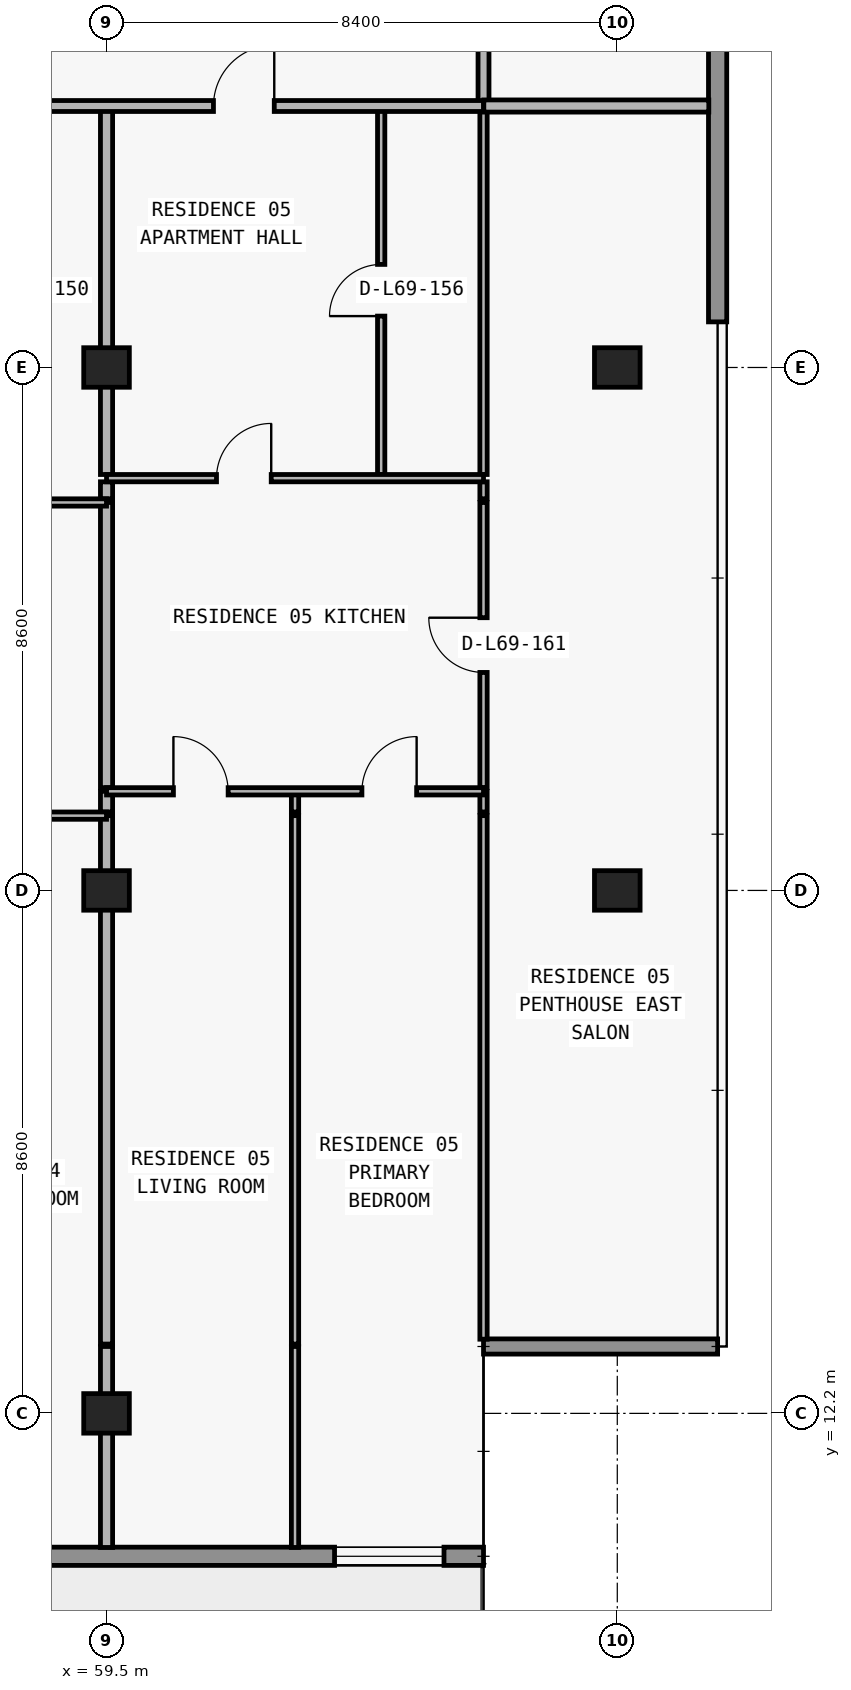
"""IFC4 building model, lengths in metres.
Left out: names, types, materials, properties, quantities, classifications, styles, units other than length and angle.
Written with IfcOpenShell. Run it as: python <this file> out.ifc"""

import sys

from ifc_helpers import new_model, si_unit, direction, frame, frame_2d, origin, origin_2d, place, context, subcontext, project, spatial, rectangle, extrude, element, fill, save


model = new_model("IFC4")
c1 = context("Model", 3, precision=1e-05, world=origin(), true_north=direction((0.0, 1.0)))
c2 = subcontext(c1, "Body", "Model", "MODEL_VIEW")
j1 = project(units=[si_unit("LENGTHUNIT", "METRE"), si_unit("PLANEANGLEUNIT", "RADIAN")], contexts=[c1])
p1 = place(None, origin())
s1 = spatial("IfcSite", under=j1, at=p1, CompositionType="ELEMENT")
p2 = place(p1, origin())
s2 = spatial("IfcBuilding", under=s1, at=p2, CompositionType="ELEMENT")
p3 = place(p2, frame((0.0, 0.0, 246.3)))
s3 = spatial("IfcBuildingStorey", under=s2, at=p3, CompositionType="ELEMENT", Elevation=246.3)
for number, where, z_axis, x_axis in (
    (1, (59.5, 12.2, 0.0), (0.0, 0.0, 1.0), (1.0, 0.0, 0.0)),
    (2, (59.5, 20.8, 0.0), (0.0, 0.0, 1.0), (1.0, 0.0, 0.0)),
    (3, (67.9, 20.8, 0.0), (0.0, 0.0, 1.0), (1.0, 0.0, 0.0)),
    (4, (59.5, 29.4, 0.0), (0.0, 0.0, 1.0), (1.0, 0.0, 0.0)),
    (5, (67.9, 29.4, 0.0), (0.0, 0.0, 1.0), (1.0, 0.0, 0.0)),
):
    element("IfcColumn", number, at=place(p3, frame(where, z_axis=z_axis, x_axis=x_axis)), inside=s3, PredefinedType="COLUMN", context=c2, shape_type="SweptSolid", body=[
        extrude(rectangle(XDim=0.75, YDim=0.65, at=origin_2d()), origin(), (0.0, 0.0, 1.0), 3.05),
    ])
p4 = place(p3, frame((65.7, 9.85, 0.0), z_axis=(0.0, 0.0, 1.0), x_axis=(-1.0, 0.0, 0.0)))
e6 = element("IfcWall", 6, at=p4, inside=s3, PredefinedType="STANDARD", context=c2, shape_type="SweptSolid", body=[
    extrude(rectangle(XDim=53.6, YDim=0.3, at=frame_2d((26.8, 0.0))), origin(), (0.0, 0.0, 1.0), 3.05),
])
p5 = place(p4, frame((48.05, 0.0, 0.85)))
e7 = element("IfcOpeningElement", 7, at=p5, cuts=e6, PredefinedType="OPENING", context=c2, shape_type="SweptSolid", body=[
    extrude(rectangle(XDim=1.8, YDim=1.55, at=frame_2d((0.9, 0.775))), frame((0.0, 0.16, 0.0), z_axis=(0.0, -1.0, 0.0), x_axis=(1.0, 0.0, 0.0)), (0.0, 0.0, 1.0), 0.32),
])
p6 = place(p4, frame((44.09, 0.0, 0.0)))
e8 = element("IfcOpeningElement", 8, at=p6, cuts=e6, PredefinedType="OPENING", context=c2, shape_type="SweptSolid", body=[
    extrude(rectangle(XDim=2.0, YDim=2.3, at=frame_2d((1.0, 1.15))), frame((0.0, 0.16, 0.0), z_axis=(0.0, -1.0, 0.0), x_axis=(1.0, 0.0, 0.0)), (0.0, 0.0, 1.0), 0.32),
])
p7 = place(p4, frame((39.99, 0.0, 0.85)))
e9 = element("IfcOpeningElement", 9, at=p7, cuts=e6, PredefinedType="OPENING", context=c2, shape_type="SweptSolid", body=[
    extrude(rectangle(XDim=1.8, YDim=1.55, at=frame_2d((0.9, 0.775))), frame((0.0, 0.16, 0.0), z_axis=(0.0, -1.0, 0.0), x_axis=(1.0, 0.0, 0.0)), (0.0, 0.0, 1.0), 0.32),
])
p8 = place(p4, frame((36.09, 0.0, 0.0)))
e10 = element("IfcOpeningElement", 10, at=p8, cuts=e6, PredefinedType="OPENING", context=c2, shape_type="SweptSolid", body=[
    extrude(rectangle(XDim=2.0, YDim=2.3, at=frame_2d((1.0, 1.15))), frame((0.0, 0.16, 0.0), z_axis=(0.0, -1.0, 0.0), x_axis=(1.0, 0.0, 0.0)), (0.0, 0.0, 1.0), 0.32),
])
p9 = place(p4, frame((31.41, 0.0, 0.65)))
e11 = element("IfcOpeningElement", 11, at=p9, cuts=e6, PredefinedType="OPENING", context=c2, shape_type="SweptSolid", body=[
    extrude(rectangle(XDim=2.6, YDim=1.85, at=frame_2d((1.3, 0.925))), frame((0.0, 0.16, 0.0), z_axis=(0.0, -1.0, 0.0), x_axis=(1.0, 0.0, 0.0)), (0.0, 0.0, 1.0), 0.32),
])
p10 = place(p4, frame((25.7, 0.0, 0.85)))
e12 = element("IfcOpeningElement", 12, at=p10, cuts=e6, PredefinedType="OPENING", context=c2, shape_type="SweptSolid", body=[
    extrude(rectangle(XDim=2.2, YDim=1.55, at=frame_2d((1.1, 0.775))), frame((0.0, 0.16, 0.0), z_axis=(0.0, -1.0, 0.0), x_axis=(1.0, 0.0, 0.0)), (0.0, 0.0, 1.0), 0.32),
])
p11 = place(p4, frame((17.7, 0.0, 0.85)))
e13 = element("IfcOpeningElement", 13, at=p11, cuts=e6, PredefinedType="OPENING", context=c2, shape_type="SweptSolid", body=[
    extrude(rectangle(XDim=2.2, YDim=1.55, at=frame_2d((1.1, 0.775))), frame((0.0, 0.16, 0.0), z_axis=(0.0, -1.0, 0.0), x_axis=(1.0, 0.0, 0.0)), (0.0, 0.0, 1.0), 0.32),
])
p12 = place(p4, frame((11.29, 0.0, 0.0)))
e14 = element("IfcOpeningElement", 14, at=p12, cuts=e6, PredefinedType="OPENING", context=c2, shape_type="SweptSolid", body=[
    extrude(rectangle(XDim=2.0, YDim=2.3, at=frame_2d((1.0, 1.15))), frame((0.0, 0.16, 0.0), z_axis=(0.0, -1.0, 0.0), x_axis=(1.0, 0.0, 0.0)), (0.0, 0.0, 1.0), 0.32),
])
p13 = place(p4, frame((7.19, 0.0, 0.85)))
e15 = element("IfcOpeningElement", 15, at=p13, cuts=e6, PredefinedType="OPENING", context=c2, shape_type="SweptSolid", body=[
    extrude(rectangle(XDim=1.8, YDim=1.55, at=frame_2d((0.9, 0.775))), frame((0.0, 0.16, 0.0), z_axis=(0.0, -1.0, 0.0), x_axis=(1.0, 0.0, 0.0)), (0.0, 0.0, 1.0), 0.32),
])
p14 = place(p4, frame((0.65, 0.0, 0.85)))
e16 = element("IfcOpeningElement", 16, at=p14, cuts=e6, PredefinedType="OPENING", context=c2, shape_type="SweptSolid", body=[
    extrude(rectangle(XDim=1.8, YDim=1.55, at=frame_2d((0.9, 0.775))), frame((0.0, 0.16, 0.0), z_axis=(0.0, -1.0, 0.0), x_axis=(1.0, 0.0, 0.0)), (0.0, 0.0, 1.0), 0.32),
])
p15 = place(p3, frame((65.7, 13.3, 0.0), z_axis=(0.0, 0.0, 1.0), x_axis=(1.0, 0.0, 0.0)))
e17 = element("IfcWall", 17, at=p15, inside=s3, PredefinedType="ELEMENTEDWALL", context=c2, shape_type="SweptSolid", body=[
    extrude(rectangle(XDim=3.85, YDim=0.25, at=frame_2d((1.925, 0.0))), origin(), (0.0, 0.0, 1.0), 3.05),
])
p16 = place(p3, frame((69.55, 47.0, 0.0), z_axis=(0.0, 0.0, 1.0), x_axis=(0.0, -1.0, 0.0)))
e18 = element("IfcWall", 18, at=p16, inside=s3, PredefinedType="STANDARD", context=c2, shape_type="SweptSolid", body=[
    extrude(rectangle(XDim=16.85, YDim=0.3, at=frame_2d((8.425, 0.0))), origin(), (0.0, 0.0, 1.0), 3.05),
])
p17 = place(p3, frame((59.5, 9.995, 0.0), z_axis=(0.0, 0.0, 1.0), x_axis=(0.0, 1.0, 0.0)))
e19 = element("IfcWall", 19, at=p17, inside=s3, PredefinedType="PARTITIONING", context=c2, shape_type="SweptSolid", body=[
    extrude(rectangle(XDim=3.305, YDim=0.2, at=frame_2d((1.652, 0.0))), origin(), (0.0, 0.0, 1.0), 2.263),
])
p18 = place(p3, frame((59.5, 13.34, 0.0), z_axis=(0.0, 0.0, 1.0), x_axis=(0.0, 1.0, 0.0)))
e20 = element("IfcWall", 20, at=p18, inside=s3, PredefinedType="PARTITIONING", context=c2, shape_type="SweptSolid", body=[
    extrude(rectangle(XDim=8.69, YDim=0.2, at=frame_2d((4.345, 0.0))), origin(), (0.0, 0.0, 1.0), 2.263),
])
p19 = place(p3, frame((59.5, 22.09, 0.0), z_axis=(0.0, 0.0, 1.0), x_axis=(0.0, 1.0, 0.0)))
e21 = element("IfcWall", 21, at=p19, inside=s3, PredefinedType="PARTITIONING", context=c2, shape_type="SweptSolid", body=[
    extrude(rectangle(XDim=0.34, YDim=0.2, at=frame_2d((0.17, 0.0))), origin(), (0.0, 0.0, 1.0), 2.263),
])
p20 = place(p3, frame((59.5, 22.49, 0.0), z_axis=(0.0, 0.0, 1.0), x_axis=(0.0, 1.0, 0.0)))
e22 = element("IfcWall", 22, at=p20, inside=s3, PredefinedType="PARTITIONING", context=c2, shape_type="SweptSolid", body=[
    extrude(rectangle(XDim=4.69, YDim=0.2, at=frame_2d((2.345, 0.0))), origin(), (0.0, 0.0, 1.0), 2.263),
])
p21 = place(p3, frame((59.5, 27.24, 0.0), z_axis=(0.0, 0.0, 1.0), x_axis=(0.0, 1.0, 0.0)))
e23 = element("IfcWall", 23, at=p21, inside=s3, PredefinedType="PARTITIONING", context=c2, shape_type="SweptSolid", body=[
    extrude(rectangle(XDim=0.28, YDim=0.2, at=frame_2d((0.14, 0.0))), origin(), (0.0, 0.0, 1.0), 2.263),
])
p22 = place(p3, frame((59.5, 27.64, 0.0), z_axis=(0.0, 0.0, 1.0), x_axis=(0.0, 1.0, 0.0)))
e24 = element("IfcWall", 24, at=p22, inside=s3, PredefinedType="PARTITIONING", context=c2, shape_type="SweptSolid", body=[
    extrude(rectangle(XDim=6.06, YDim=0.2, at=frame_2d((3.03, 0.0))), origin(), (0.0, 0.0, 1.0), 2.263),
])
p23 = place(p3, frame((62.6, 9.995, 0.0), z_axis=(0.0, 0.0, 1.0), x_axis=(0.0, 1.0, 0.0)))
e25 = element("IfcWall", 25, at=p23, inside=s3, PredefinedType="PARTITIONING", context=c2, shape_type="SweptSolid", body=[
    extrude(rectangle(XDim=3.305, YDim=0.12, at=frame_2d((1.652, 0.0))), origin(), (0.0, 0.0, 1.0), 3.05),
])
p24 = place(p3, frame((62.6, 13.34, 0.0), z_axis=(0.0, 0.0, 1.0), x_axis=(0.0, 1.0, 0.0)))
e26 = element("IfcWall", 26, at=p24, inside=s3, PredefinedType="PARTITIONING", context=c2, shape_type="SweptSolid", body=[
    extrude(rectangle(XDim=8.69, YDim=0.12, at=frame_2d((4.345, 0.0))), origin(), (0.0, 0.0, 1.0), 3.05),
])
p25 = place(p3, frame((62.6, 22.09, 0.0), z_axis=(0.0, 0.0, 1.0), x_axis=(0.0, 1.0, 0.0)))
e27 = element("IfcWall", 27, at=p25, inside=s3, PredefinedType="PARTITIONING", context=c2, shape_type="SweptSolid", body=[
    extrude(rectangle(XDim=0.34, YDim=0.12, at=frame_2d((0.17, 0.0))), origin(), (0.0, 0.0, 1.0), 3.05),
])
p26 = place(p3, frame((64.017, 27.64, 0.0), z_axis=(0.0, 0.0, 1.0), x_axis=(0.0, 1.0, 0.0)))
e28 = element("IfcWall", 28, at=p26, inside=s3, PredefinedType="PARTITIONING", context=c2, shape_type="SweptSolid", body=[
    extrude(rectangle(XDim=6.06, YDim=0.12, at=frame_2d((3.03, 0.0))), origin(), (0.0, 0.0, 1.0), 3.05),
])
p27 = place(p26, frame((2.605, 0.0, 0.0)))
e29 = element("IfcOpeningElement", 29, at=p27, cuts=e28, PredefinedType="OPENING", context=c2, shape_type="SweptSolid", body=[
    extrude(rectangle(XDim=0.85, YDim=2.1, at=frame_2d((0.425, 1.05))), frame((0.0, 0.07, 0.0), z_axis=(0.0, -1.0, 0.0), x_axis=(1.0, 0.0, 0.0)), (0.0, 0.0, 1.0), 0.14),
])
p28 = place(p3, frame((65.7, 13.42, 0.0), z_axis=(0.0, 0.0, 1.0), x_axis=(0.0, 1.0, 0.0)))
e30 = element("IfcWall", 30, at=p28, inside=s3, PredefinedType="PARTITIONING", context=c2, shape_type="SweptSolid", body=[
    extrude(rectangle(XDim=8.61, YDim=0.12, at=frame_2d((4.305, 0.0))), origin(), (0.0, 0.0, 1.0), 2.629),
])
p29 = place(p3, frame((65.7, 22.09, 0.0), z_axis=(0.0, 0.0, 1.0), x_axis=(0.0, 1.0, 0.0)))
e31 = element("IfcWall", 31, at=p29, inside=s3, PredefinedType="PARTITIONING", context=c2, shape_type="SweptSolid", body=[
    extrude(rectangle(XDim=0.34, YDim=0.12, at=frame_2d((0.17, 0.0))), origin(), (0.0, 0.0, 1.0), 2.629),
])
p30 = place(p3, frame((65.7, 22.49, 0.0), z_axis=(0.0, 0.0, 1.0), x_axis=(0.0, 1.0, 0.0)))
e32 = element("IfcWall", 32, at=p30, inside=s3, PredefinedType="PARTITIONING", context=c2, shape_type="SweptSolid", body=[
    extrude(rectangle(XDim=4.69, YDim=0.12, at=frame_2d((2.345, 0.0))), origin(), (0.0, 0.0, 1.0), 2.629),
])
p31 = place(p30, frame((1.895, 0.0, 0.0)))
e33 = element("IfcOpeningElement", 33, at=p31, cuts=e32, PredefinedType="OPENING", context=c2, shape_type="SweptSolid", body=[
    extrude(rectangle(XDim=0.9, YDim=2.15, at=frame_2d((0.45, 1.075))), frame((0.0, 0.07, 0.0), z_axis=(0.0, -1.0, 0.0), x_axis=(1.0, 0.0, 0.0)), (0.0, 0.0, 1.0), 0.14),
])
p32 = place(p3, frame((65.7, 27.24, 0.0), z_axis=(0.0, 0.0, 1.0), x_axis=(0.0, 1.0, 0.0)))
e34 = element("IfcWall", 34, at=p32, inside=s3, PredefinedType="PARTITIONING", context=c2, shape_type="SweptSolid", body=[
    extrude(rectangle(XDim=0.28, YDim=0.12, at=frame_2d((0.14, 0.0))), origin(), (0.0, 0.0, 1.0), 2.629),
])
p33 = place(p3, frame((65.7, 27.64, 0.0), z_axis=(0.0, 0.0, 1.0), x_axis=(0.0, 1.0, 0.0)))
e35 = element("IfcWall", 35, at=p33, inside=s3, PredefinedType="PARTITIONING", context=c2, shape_type="SweptSolid", body=[
    extrude(rectangle(XDim=6.06, YDim=0.12, at=frame_2d((3.03, 0.0))), origin(), (0.0, 0.0, 1.0), 2.629),
])
p34 = place(p3, frame((65.7, 33.705, 0.0), z_axis=(0.0, 0.0, 1.0), x_axis=(0.0, 1.0, 0.0)))
e36 = element("IfcWall", 36, at=p34, inside=s3, PredefinedType="PARTITIONING", context=c2, shape_type="SweptSolid", body=[
    extrude(rectangle(XDim=3.295, YDim=0.18, at=frame_2d((1.647, 0.0))), origin(), (0.0, 0.0, 1.0), 2.629),
])
p35 = place(p3, frame((51.32, 22.03, 0.0), z_axis=(0.0, 0.0, 1.0), x_axis=(1.0, 0.0, 0.0)))
e37 = element("IfcWall", 37, at=p35, inside=s3, PredefinedType="PARTITIONING", context=c2, shape_type="SweptSolid", body=[
    extrude(rectangle(XDim=8.18, YDim=0.12, at=frame_2d((4.09, 0.0))), origin(), (0.0, 0.0, 1.0), 3.05),
])
p36 = place(p35, frame((1.583, 0.0, 0.0)))
e38 = element("IfcOpeningElement", 38, at=p36, cuts=e37, PredefinedType="OPENING", context=c2, shape_type="SweptSolid", body=[
    extrude(rectangle(XDim=0.9, YDim=2.15, at=frame_2d((0.45, 1.075))), frame((0.0, 0.07, 0.0), z_axis=(0.0, -1.0, 0.0), x_axis=(1.0, 0.0, 0.0)), (0.0, 0.0, 1.0), 0.14),
])
p37 = place(p35, frame((5.84, 0.0, 0.0)))
e39 = element("IfcOpeningElement", 39, at=p37, cuts=e37, PredefinedType="OPENING", context=c2, shape_type="SweptSolid", body=[
    extrude(rectangle(XDim=0.9, YDim=2.15, at=frame_2d((0.45, 1.075))), frame((0.0, 0.07, 0.0), z_axis=(0.0, -1.0, 0.0), x_axis=(1.0, 0.0, 0.0)), (0.0, 0.0, 1.0), 0.14),
])
p38 = place(p3, frame((59.5, 22.43, 0.0), z_axis=(0.0, 0.0, 1.0), x_axis=(1.0, 0.0, 0.0)))
e40 = element("IfcWall", 40, at=p38, inside=s3, PredefinedType="PARTITIONING", context=c2, shape_type="SweptSolid", body=[
    extrude(rectangle(XDim=6.2, YDim=0.12, at=frame_2d((3.1, 0.0))), origin(), (0.0, 0.0, 1.0), 3.05),
])
p39 = place(p38, frame((1.1, 0.0, 0.0)))
e41 = element("IfcOpeningElement", 41, at=p39, cuts=e40, PredefinedType="OPENING", context=c2, shape_type="SweptSolid", body=[
    extrude(rectangle(XDim=0.9, YDim=2.15, at=frame_2d((0.45, 1.075))), frame((0.0, 0.07, 0.0), z_axis=(0.0, -1.0, 0.0), x_axis=(1.0, 0.0, 0.0)), (0.0, 0.0, 1.0), 0.14),
])
p40 = place(p38, frame((4.2, 0.0, 0.0)))
e42 = element("IfcOpeningElement", 42, at=p40, cuts=e40, PredefinedType="OPENING", context=c2, shape_type="SweptSolid", body=[
    extrude(rectangle(XDim=0.9, YDim=2.15, at=frame_2d((0.45, 1.075))), frame((0.0, 0.07, 0.0), z_axis=(0.0, -1.0, 0.0), x_axis=(1.0, 0.0, 0.0)), (0.0, 0.0, 1.0), 0.14),
])
p41 = place(p3, frame((51.32, 27.18, 0.0), z_axis=(0.0, 0.0, 1.0), x_axis=(1.0, 0.0, 0.0)))
e43 = element("IfcWall", 43, at=p41, inside=s3, PredefinedType="PARTITIONING", context=c2, shape_type="SweptSolid", body=[
    extrude(rectangle(XDim=8.18, YDim=0.12, at=frame_2d((4.09, 0.0))), origin(), (0.0, 0.0, 1.0), 3.05),
])
p42 = place(p41, frame((1.583, 0.0, 0.0)))
e44 = element("IfcOpeningElement", 44, at=p42, cuts=e43, PredefinedType="OPENING", context=c2, shape_type="SweptSolid", body=[
    extrude(rectangle(XDim=0.9, YDim=2.15, at=frame_2d((0.45, 1.075))), frame((0.0, 0.07, 0.0), z_axis=(0.0, -1.0, 0.0), x_axis=(1.0, 0.0, 0.0)), (0.0, 0.0, 1.0), 0.14),
])
p43 = place(p3, frame((59.5, 27.58, 0.0), z_axis=(0.0, 0.0, 1.0), x_axis=(1.0, 0.0, 0.0)))
e45 = element("IfcWall", 45, at=p43, inside=s3, PredefinedType="PARTITIONING", context=c2, shape_type="SweptSolid", body=[
    extrude(rectangle(XDim=6.2, YDim=0.12, at=frame_2d((3.1, 0.0))), origin(), (0.0, 0.0, 1.0), 3.05),
])
p44 = place(p43, frame((1.809, 0.0, 0.0)))
e46 = element("IfcOpeningElement", 46, at=p44, cuts=e45, PredefinedType="OPENING", context=c2, shape_type="SweptSolid", body=[
    extrude(rectangle(XDim=0.9, YDim=2.15, at=frame_2d((0.45, 1.075))), frame((0.0, 0.07, 0.0), z_axis=(0.0, -1.0, 0.0), x_axis=(1.0, 0.0, 0.0)), (0.0, 0.0, 1.0), 0.14),
])
p45 = place(p3, frame((41.2, 33.7, 0.0), z_axis=(0.0, 0.0, 1.0), x_axis=(1.0, 0.0, 0.0)))
e47 = element("IfcWall", 47, at=p45, inside=s3, PredefinedType="PARTITIONING", context=c2, shape_type="SweptSolid", body=[
    extrude(rectangle(XDim=24.5, YDim=0.18, at=frame_2d((12.25, 0.0))), origin(), (0.0, 0.0, 1.0), 3.05),
])
p46 = place(p45, frame((12.775, 0.0, 0.0)))
e48 = element("IfcOpeningElement", 48, at=p46, cuts=e47, PredefinedType="OPENING", context=c2, shape_type="SweptSolid", body=[
    extrude(rectangle(XDim=1.0, YDim=2.2, at=frame_2d((0.5, 1.1))), frame((0.0, 0.1, 0.0), z_axis=(0.0, -1.0, 0.0), x_axis=(1.0, 0.0, 0.0)), (0.0, 0.0, 1.0), 0.2),
])
p47 = place(p45, frame((20.059, 0.0, 0.0)))
e49 = element("IfcOpeningElement", 49, at=p47, cuts=e47, PredefinedType="OPENING", context=c2, shape_type="SweptSolid", body=[
    extrude(rectangle(XDim=1.0, YDim=2.2, at=frame_2d((0.5, 1.1))), frame((0.0, 0.1, 0.0), z_axis=(0.0, -1.0, 0.0), x_axis=(1.0, 0.0, 0.0)), (0.0, 0.0, 1.0), 0.2),
])
p48 = place(p3, frame((65.705, 33.7, 0.0), z_axis=(0.0, 0.0, 1.0), x_axis=(1.0, 0.0, 0.0)))
e50 = element("IfcWall", 50, at=p48, inside=s3, PredefinedType="PARTITIONING", context=c2, shape_type="SweptSolid", body=[
    extrude(rectangle(XDim=3.7, YDim=0.2, at=frame_2d((1.85, 0.0))), origin(), (0.0, 0.0, 1.0), 3.05),
])
p49 = place(p14, origin())
e51 = element("IfcWindow", 51, at=p49, inside=s3, PartitioningType="SINGLE_PANEL", PredefinedType="WINDOW", context=c2, shape_type="SweptSolid", body=[
    extrude(rectangle(XDim=1.8, YDim=1.55, at=frame_2d((0.9, 0.775))), frame((0.0, 0.03, 0.0), z_axis=(0.0, -1.0, 0.0), x_axis=(1.0, 0.0, 0.0)), (0.0, 0.0, 1.0), 0.06),
])
fill(e16, e51)
p50 = place(p47, origin())
e52 = element("IfcDoor", 52, at=p50, inside=s3, OperationType="SINGLE_SWING_RIGHT", PredefinedType="DOOR", context=c2, shape_type="SweptSolid", body=[
    extrude(rectangle(XDim=1.0, YDim=2.2, at=frame_2d((0.5, 1.1))), frame((0.0, 0.025, 0.0), z_axis=(0.0, -1.0, 0.0), x_axis=(1.0, 0.0, 0.0)), (0.0, 0.0, 1.0), 0.05),
])
fill(e49, e52)
p51 = place(p27, origin())
e53 = element("IfcDoor", 53, at=p51, inside=s3, OperationType="SINGLE_SWING_LEFT", PredefinedType="DOOR", context=c2, shape_type="SweptSolid", body=[
    extrude(rectangle(XDim=0.85, YDim=2.1, at=frame_2d((0.425, 1.05))), frame((0.0, 0.025, 0.0), z_axis=(0.0, -1.0, 0.0), x_axis=(1.0, 0.0, 0.0)), (0.0, 0.0, 1.0), 0.05),
])
fill(e29, e53)
p52 = place(p44, origin())
e54 = element("IfcDoor", 54, at=p52, inside=s3, OperationType="SINGLE_SWING_RIGHT", PredefinedType="DOOR", context=c2, shape_type="SweptSolid", body=[
    extrude(rectangle(XDim=0.9, YDim=2.15, at=frame_2d((0.45, 1.075))), frame((0.0, 0.025, 0.0), z_axis=(0.0, -1.0, 0.0), x_axis=(1.0, 0.0, 0.0)), (0.0, 0.0, 1.0), 0.05),
])
fill(e46, e54)
p53 = place(p39, origin())
e55 = element("IfcDoor", 55, at=p53, inside=s3, OperationType="SINGLE_SWING_LEFT", PredefinedType="DOOR", context=c2, shape_type="SweptSolid", body=[
    extrude(rectangle(XDim=0.9, YDim=2.15, at=frame_2d((0.45, 1.075))), frame((0.0, 0.025, 0.0), z_axis=(0.0, -1.0, 0.0), x_axis=(1.0, 0.0, 0.0)), (0.0, 0.0, 1.0), 0.05),
])
fill(e41, e55)
p54 = place(p40, origin())
e56 = element("IfcDoor", 56, at=p54, inside=s3, OperationType="SINGLE_SWING_RIGHT", PredefinedType="DOOR", context=c2, shape_type="SweptSolid", body=[
    extrude(rectangle(XDim=0.9, YDim=2.15, at=frame_2d((0.45, 1.075))), frame((0.0, 0.025, 0.0), z_axis=(0.0, -1.0, 0.0), x_axis=(1.0, 0.0, 0.0)), (0.0, 0.0, 1.0), 0.05),
])
fill(e42, e56)
p55 = place(p31, origin())
e57 = element("IfcDoor", 57, at=p55, inside=s3, OperationType="SINGLE_SWING_RIGHT", PredefinedType="DOOR", context=c2, shape_type="SweptSolid", body=[
    extrude(rectangle(XDim=0.9, YDim=2.15, at=frame_2d((0.45, 1.075))), frame((0.0, 0.025, 0.0), z_axis=(0.0, -1.0, 0.0), x_axis=(1.0, 0.0, 0.0)), (0.0, 0.0, 1.0), 0.05),
])
fill(e33, e57)
save(model, sys.argv[1])
